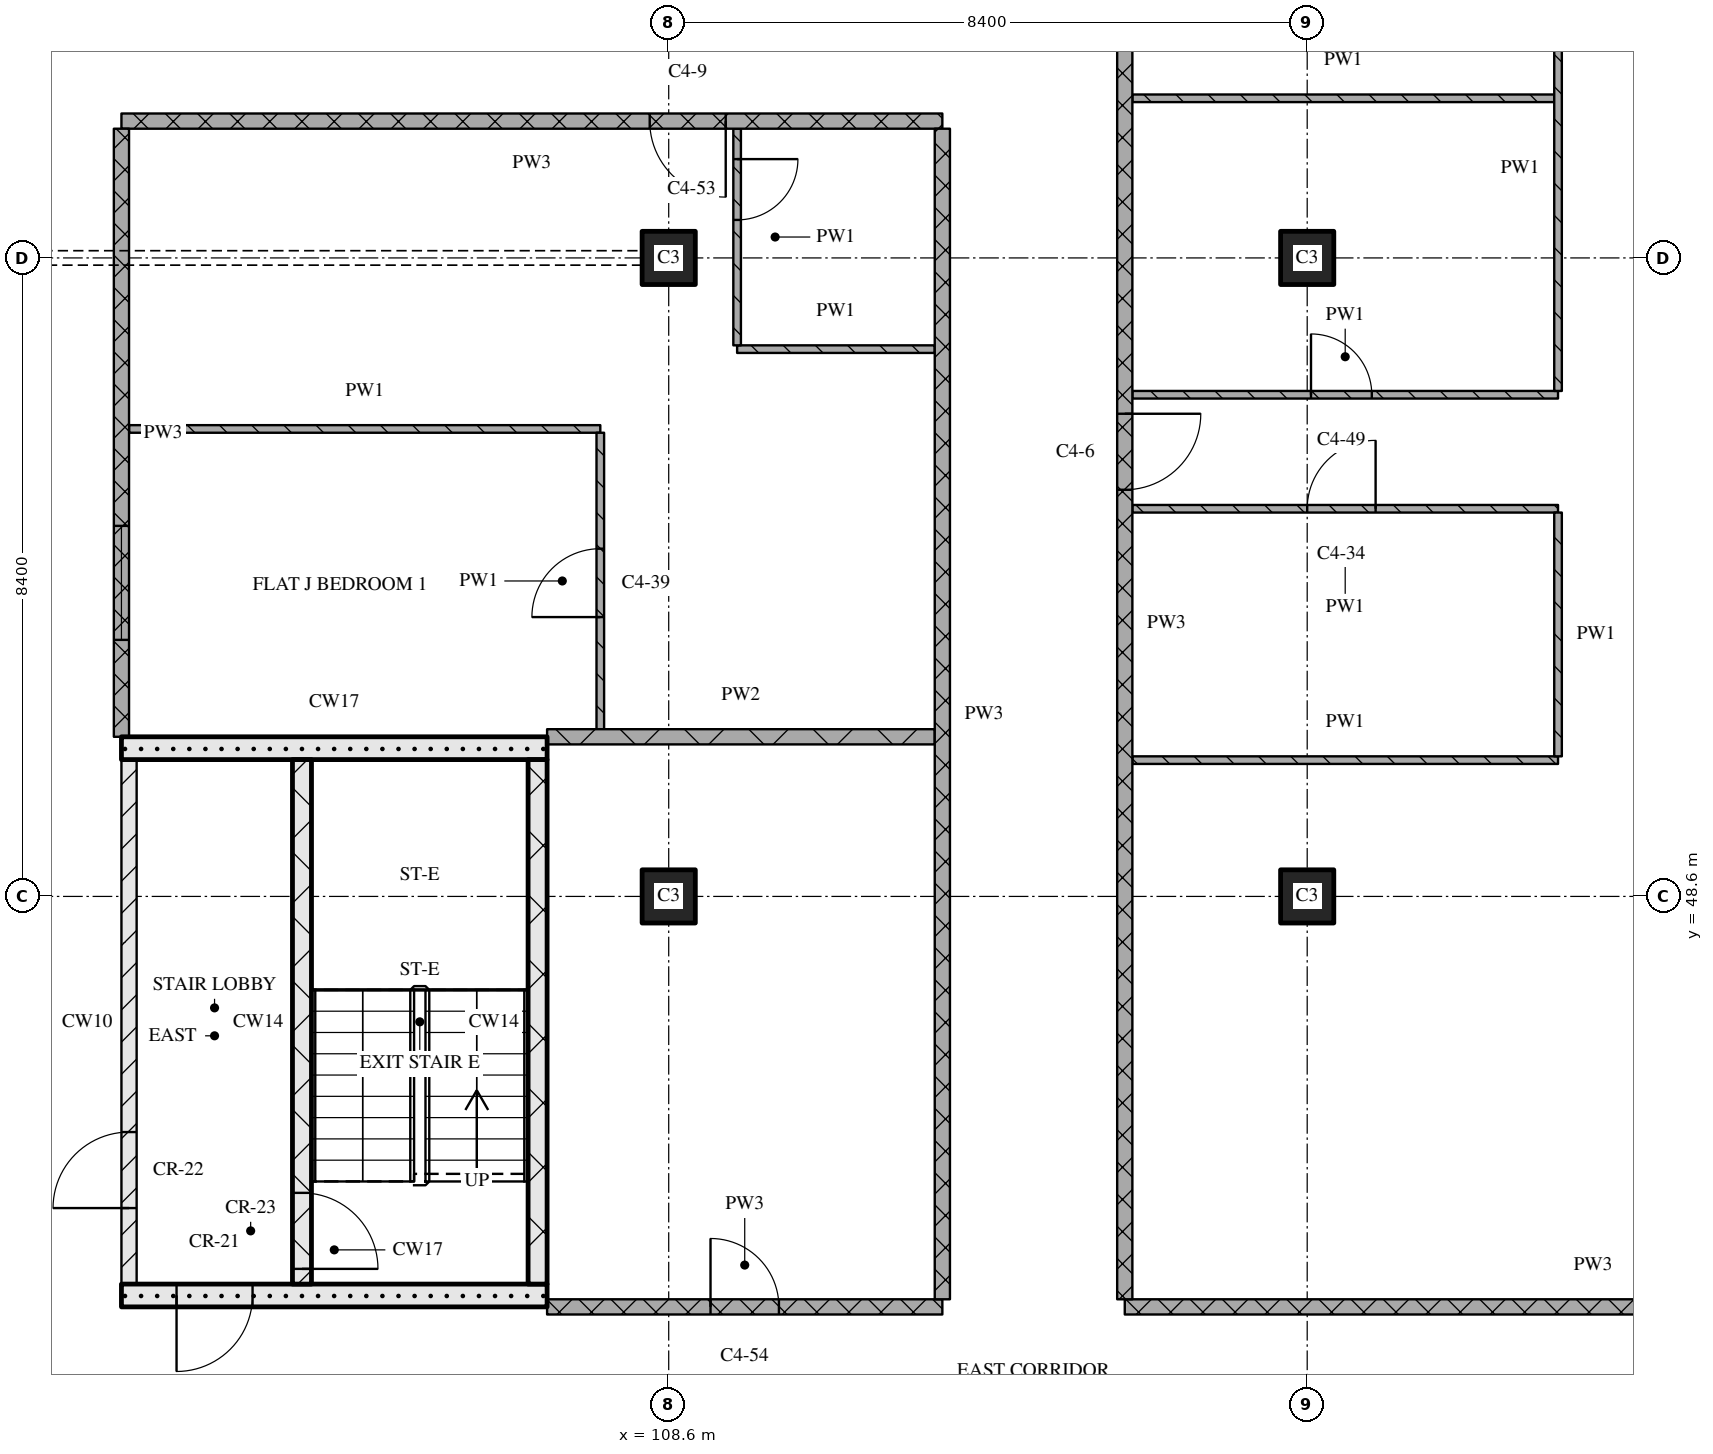
"""IFC4 building model, lengths in metres.
Left out: names, types, materials, properties, quantities, classifications, styles, units other than length and angle.
Written with IfcOpenShell. Run it as: python <this file> out.ifc"""

import sys

from ifc_helpers import new_model, si_unit, direction, frame, frame_2d, origin, origin_2d, place, context, subcontext, project, spatial, rectangle, extrude, element, fill, save


model = new_model("IFC4")
c1 = context("Model", 3, precision=1e-05, world=origin(), true_north=direction((0.0, 1.0)))
c2 = subcontext(c1, "Body", "Model", "MODEL_VIEW")
j1 = project(units=[si_unit("LENGTHUNIT", "METRE"), si_unit("PLANEANGLEUNIT", "RADIAN")], contexts=[c1])
p1 = place(None, origin())
s1 = spatial("IfcSite", under=j1, at=p1, CompositionType="ELEMENT")
p2 = place(p1, origin())
s2 = spatial("IfcBuilding", under=s1, at=p2, CompositionType="ELEMENT")
p3 = place(p2, frame((0.0, 0.0, 187.05)))
s3 = spatial("IfcBuildingStorey", under=s2, at=p3, CompositionType="ELEMENT", Elevation=187.05)
for number, where, z_axis, x_axis in (
    (1, (108.6, 48.6, 0.0), (0.0, 0.0, 1.0), (1.0, 0.0, 0.0)),
    (2, (108.6, 57.0, 0.0), (0.0, 0.0, 1.0), (1.0, 0.0, 0.0)),
    (3, (117.0, 48.6, 0.0), (0.0, 0.0, 1.0), (1.0, 0.0, 0.0)),
    (4, (117.0, 57.0, 0.0), (0.0, 0.0, 1.0), (1.0, 0.0, 0.0)),
):
    element("IfcColumn", number, at=place(p3, frame(where, z_axis=z_axis, x_axis=x_axis)), inside=s3, PredefinedType="COLUMN", context=c2, shape_type="SweptSolid", body=[
        extrude(rectangle(XDim=0.7, YDim=0.7, at=origin_2d()), origin(), (0.0, 0.0, 1.0), 3.6),
    ])
p4 = place(p3, frame((101.4, 43.35, 0.0), z_axis=(0.0, 0.0, 1.0), x_axis=(1.0, 0.0, 0.0)))
e5 = element("IfcWall", 5, at=p4, inside=s3, PredefinedType="SOLIDWALL", context=c2, shape_type="SweptSolid", body=[
    extrude(rectangle(XDim=5.6, YDim=0.3, at=frame_2d((2.8, 0.0))), origin(), (0.0, 0.0, 1.0), 3.32),
])
p5 = place(p4, frame((0.725, 0.0, 0.0)))
e6 = element("IfcOpeningElement", 6, at=p5, cuts=e5, PredefinedType="OPENING", context=c2, shape_type="SweptSolid", body=[
    extrude(rectangle(XDim=1.0, YDim=2.1, at=frame_2d((0.5, 1.05))), frame((0.0, 0.16, 0.0), z_axis=(0.0, -1.0, 0.0), x_axis=(1.0, 0.0, 0.0)), (0.0, 0.0, 1.0), 0.32),
])
p6 = place(p3, frame((101.5, 43.5, 0.0), z_axis=(0.0, 0.0, 1.0), x_axis=(0.0, 1.0, 0.0)))
e7 = element("IfcWall", 7, at=p6, inside=s3, PredefinedType="PARTITIONING", context=c2, shape_type="SweptSolid", body=[
    extrude(rectangle(XDim=6.9, YDim=0.2, at=frame_2d((3.45, 0.0))), origin(), (0.0, 0.0, 1.0), 3.32),
])
p7 = place(p6, frame((1.0, 0.0, 0.0)))
e8 = element("IfcOpeningElement", 8, at=p7, cuts=e7, PredefinedType="OPENING", context=c2, shape_type="SweptSolid", body=[
    extrude(rectangle(XDim=1.0, YDim=2.1, at=frame_2d((0.5, 1.05))), frame((0.0, 0.11, 0.0), z_axis=(0.0, -1.0, 0.0), x_axis=(1.0, 0.0, 0.0)), (0.0, 0.0, 1.0), 0.22),
])
p8 = place(p3, frame((103.775, 43.5, 0.0), z_axis=(0.0, 0.0, 1.0), x_axis=(0.0, 1.0, 0.0)))
e9 = element("IfcWall", 9, at=p8, inside=s3, PredefinedType="SOLIDWALL", context=c2, shape_type="SweptSolid", body=[
    extrude(rectangle(XDim=6.9, YDim=0.25, at=frame_2d((3.45, 0.0))), origin(), (0.0, 0.0, 1.0), 3.32),
])
p9 = place(p8, frame((0.2, 0.0, 0.0)))
e10 = element("IfcOpeningElement", 10, at=p9, cuts=e9, PredefinedType="OPENING", context=c2, shape_type="SweptSolid", body=[
    extrude(rectangle(XDim=1.0, YDim=2.1, at=frame_2d((0.5, 1.05))), frame((0.0, 0.135, 0.0), z_axis=(0.0, -1.0, 0.0), x_axis=(1.0, 0.0, 0.0)), (0.0, 0.0, 1.0), 0.27),
])
p10 = place(p3, frame((106.875, 43.5, 0.0), z_axis=(0.0, 0.0, 1.0), x_axis=(0.0, 1.0, 0.0)))
e11 = element("IfcWall", 11, at=p10, inside=s3, PredefinedType="SOLIDWALL", context=c2, shape_type="SweptSolid", body=[
    extrude(rectangle(XDim=6.9, YDim=0.25, at=frame_2d((3.45, 0.0))), origin(), (0.0, 0.0, 1.0), 3.32),
])
p11 = place(p3, frame((101.4, 50.55, 0.0), z_axis=(0.0, 0.0, 1.0), x_axis=(1.0, 0.0, 0.0)))
e12 = element("IfcWall", 12, at=p11, inside=s3, PredefinedType="SOLIDWALL", context=c2, shape_type="SweptSolid", body=[
    extrude(rectangle(XDim=5.6, YDim=0.3, at=frame_2d((2.8, 0.0))), origin(), (0.0, 0.0, 1.0), 3.32),
])
p12 = place(p3, frame((107.0, 43.2, 0.0), z_axis=(0.0, 0.0, 1.0), x_axis=(1.0, 0.0, 0.0)))
e13 = element("IfcWall", 13, at=p12, inside=s3, PredefinedType="PARTITIONING", context=c2, shape_type="SweptSolid", body=[
    extrude(rectangle(XDim=5.2, YDim=0.2, at=frame_2d((2.6, 0.0))), origin(), (0.0, 0.0, 1.0), 3.32),
])
p13 = place(p12, frame((2.15, 0.0, 0.0)))
e14 = element("IfcOpeningElement", 14, at=p13, cuts=e13, PredefinedType="OPENING", context=c2, shape_type="SweptSolid", body=[
    extrude(rectangle(XDim=0.9, YDim=2.1, at=frame_2d((0.45, 1.05))), frame((0.0, 0.11, 0.0), z_axis=(0.0, -1.0, 0.0), x_axis=(1.0, 0.0, 0.0)), (0.0, 0.0, 1.0), 0.22),
])
p14 = place(p3, frame((114.6, 43.2, 0.0), z_axis=(0.0, 0.0, 1.0), x_axis=(1.0, 0.0, 0.0)))
e15 = element("IfcWall", 15, at=p14, inside=s3, PredefinedType="PARTITIONING", context=c2, shape_type="SweptSolid", body=[
    extrude(rectangle(XDim=12.32, YDim=0.2, at=frame_2d((6.16, 0.0))), origin(), (0.0, 0.0, 1.0), 3.32),
])
p15 = place(p3, frame((114.7, 50.393, 0.0), z_axis=(0.0, 0.0, 1.0), x_axis=(1.0, 0.0, 0.0)))
e16 = element("IfcWall", 16, at=p15, inside=s3, PredefinedType="PARTITIONING", context=c2, shape_type="SweptSolid", body=[
    extrude(rectangle(XDim=5.6, YDim=0.1, at=frame_2d((2.8, 0.0))), origin(), (0.0, 0.0, 1.0), 3.32),
])
p16 = place(p3, frame((107.0, 50.7, 0.0), z_axis=(0.0, 0.0, 1.0), x_axis=(1.0, 0.0, 0.0)))
e17 = element("IfcWall", 17, at=p16, inside=s3, PredefinedType="PARTITIONING", context=c2, shape_type="SweptSolid", body=[
    extrude(rectangle(XDim=5.1, YDim=0.2, at=frame_2d((2.55, 0.0))), origin(), (0.0, 0.0, 1.0), 3.32),
])
p17 = place(p3, frame((120.3, 53.7, 0.0), z_axis=(0.0, 0.0, 1.0), x_axis=(-1.0, 0.0, 0.0)))
e18 = element("IfcWall", 18, at=p17, inside=s3, PredefinedType="PARTITIONING", context=c2, shape_type="SweptSolid", body=[
    extrude(rectangle(XDim=5.6, YDim=0.1, at=frame_2d((2.8, 0.0))), origin(), (0.0, 0.0, 1.0), 3.32),
])
p18 = place(p17, frame((2.4, 0.0, 0.0)))
e19 = element("IfcOpeningElement", 19, at=p18, cuts=e18, PredefinedType="OPENING", context=c2, shape_type="SweptSolid", body=[
    extrude(rectangle(XDim=0.9, YDim=2.1, at=frame_2d((0.45, 1.05))), frame((0.0, 0.06, 0.0), z_axis=(0.0, -1.0, 0.0), x_axis=(1.0, 0.0, 0.0)), (0.0, 0.0, 1.0), 0.12),
])
p19 = place(p3, frame((101.5, 54.75, 0.0), z_axis=(0.0, 0.0, 1.0), x_axis=(1.0, 0.0, 0.0)))
e20 = element("IfcWall", 20, at=p19, inside=s3, PredefinedType="PARTITIONING", context=c2, shape_type="SweptSolid", body=[
    extrude(rectangle(XDim=6.2, YDim=0.1, at=frame_2d((3.1, 0.0))), origin(), (0.0, 0.0, 1.0), 3.32),
])
p20 = place(p3, frame((114.7, 55.2, 0.0), z_axis=(0.0, 0.0, 1.0), x_axis=(1.0, 0.0, 0.0)))
e21 = element("IfcWall", 21, at=p20, inside=s3, PredefinedType="PARTITIONING", context=c2, shape_type="SweptSolid", body=[
    extrude(rectangle(XDim=5.6, YDim=0.1, at=frame_2d((2.8, 0.0))), origin(), (0.0, 0.0, 1.0), 3.32),
])
p21 = place(p20, frame((2.35, 0.0, 0.0)))
e22 = element("IfcOpeningElement", 22, at=p21, cuts=e21, PredefinedType="OPENING", context=c2, shape_type="SweptSolid", body=[
    extrude(rectangle(XDim=0.8, YDim=2.1, at=frame_2d((0.4, 1.05))), frame((0.0, 0.06, 0.0), z_axis=(0.0, -1.0, 0.0), x_axis=(1.0, 0.0, 0.0)), (0.0, 0.0, 1.0), 0.12),
])
p22 = place(p3, frame((109.5, 55.8, 0.0), z_axis=(0.0, 0.0, 1.0), x_axis=(1.0, 0.0, 0.0)))
e23 = element("IfcWall", 23, at=p22, inside=s3, PredefinedType="PARTITIONING", context=c2, shape_type="SweptSolid", body=[
    extrude(rectangle(XDim=2.6, YDim=0.1, at=frame_2d((1.3, 0.0))), origin(), (0.0, 0.0, 1.0), 3.32),
])
p23 = place(p3, frame((112.2, 58.8, 0.0), z_axis=(0.0, 0.0, 1.0), x_axis=(-1.0, 0.0, 0.0)))
e24 = element("IfcWall", 24, at=p23, inside=s3, PredefinedType="PARTITIONING", context=c2, shape_type="SweptSolid", body=[
    extrude(rectangle(XDim=10.8, YDim=0.2, at=frame_2d((5.4, 0.0))), origin(), (0.0, 0.0, 1.0), 3.32),
])
p24 = place(p23, frame((2.85, 0.0, 0.0)))
e25 = element("IfcOpeningElement", 25, at=p24, cuts=e24, PredefinedType="OPENING", context=c2, shape_type="SweptSolid", body=[
    extrude(rectangle(XDim=1.0, YDim=2.1, at=frame_2d((0.5, 1.05))), frame((0.0, 0.11, 0.0), z_axis=(0.0, -1.0, 0.0), x_axis=(1.0, 0.0, 0.0)), (0.0, 0.0, 1.0), 0.22),
])
p25 = place(p3, frame((114.7, 59.1, 0.0), z_axis=(0.0, 0.0, 1.0), x_axis=(1.0, 0.0, 0.0)))
e26 = element("IfcWall", 26, at=p25, inside=s3, PredefinedType="PARTITIONING", context=c2, shape_type="SweptSolid", body=[
    extrude(rectangle(XDim=5.55, YDim=0.1, at=frame_2d((2.775, 0.0))), origin(), (0.0, 0.0, 1.0), 3.32),
])
p26 = place(p3, frame((101.4, 58.7, 0.0), z_axis=(0.0, 0.0, 1.0), x_axis=(0.0, -1.0, 0.0)))
e27 = element("IfcWall", 27, at=p26, inside=s3, PredefinedType="PARTITIONING", context=c2, shape_type="SweptSolid", body=[
    extrude(rectangle(XDim=8.0, YDim=0.2, at=frame_2d((4.0, 0.0))), origin(), (0.0, 0.0, 1.0), 3.32),
])
p27 = place(p26, frame((5.225, 0.0, 0.9)))
e28 = element("IfcOpeningElement", 28, at=p27, cuts=e27, PredefinedType="OPENING", context=c2, shape_type="SweptSolid", body=[
    extrude(rectangle(XDim=1.5, YDim=1.5, at=frame_2d((0.75, 0.75))), frame((0.0, 0.11, 0.0), z_axis=(0.0, -1.0, 0.0), x_axis=(1.0, 0.0, 0.0)), (0.0, 0.0, 1.0), 0.22),
])
p28 = place(p3, frame((107.7, 50.8, 0.0), z_axis=(0.0, 0.0, 1.0), x_axis=(0.0, 1.0, 0.0)))
e29 = element("IfcWall", 29, at=p28, inside=s3, PredefinedType="PARTITIONING", context=c2, shape_type="SweptSolid", body=[
    extrude(rectangle(XDim=3.9, YDim=0.1, at=frame_2d((1.95, 0.0))), origin(), (0.0, 0.0, 1.0), 3.32),
])
p29 = place(p28, frame((1.475, 0.0, 0.0)))
e30 = element("IfcOpeningElement", 30, at=p29, cuts=e29, PredefinedType="OPENING", context=c2, shape_type="SweptSolid", body=[
    extrude(rectangle(XDim=0.9, YDim=2.1, at=frame_2d((0.45, 1.05))), frame((0.0, 0.06, 0.0), z_axis=(0.0, -1.0, 0.0), x_axis=(1.0, 0.0, 0.0)), (0.0, 0.0, 1.0), 0.12),
])
p30 = place(p3, frame((109.5, 58.7, 0.0), z_axis=(0.0, 0.0, 1.0), x_axis=(0.0, -1.0, 0.0)))
e31 = element("IfcWall", 31, at=p30, inside=s3, PredefinedType="PARTITIONING", context=c2, shape_type="SweptSolid", body=[
    extrude(rectangle(XDim=2.85, YDim=0.1, at=frame_2d((1.425, 0.0))), origin(), (0.0, 0.0, 1.0), 3.32),
])
p31 = place(p30, frame((0.4, 0.0, 0.0)))
e32 = element("IfcOpeningElement", 32, at=p31, cuts=e31, PredefinedType="OPENING", context=c2, shape_type="SweptSolid", body=[
    extrude(rectangle(XDim=0.8, YDim=2.1, at=frame_2d((0.4, 1.05))), frame((0.0, 0.06, 0.0), z_axis=(0.0, -1.0, 0.0), x_axis=(1.0, 0.0, 0.0)), (0.0, 0.0, 1.0), 0.12),
])
p32 = place(p3, frame((112.2, 58.7, 0.0), z_axis=(0.0, 0.0, 1.0), x_axis=(0.0, -1.0, 0.0)))
e33 = element("IfcWall", 33, at=p32, inside=s3, PredefinedType="PARTITIONING", context=c2, shape_type="SweptSolid", body=[
    extrude(rectangle(XDim=15.4, YDim=0.2, at=frame_2d((7.7, 0.0))), origin(), (0.0, 0.0, 1.0), 3.32),
])
p33 = place(p3, frame((114.6, 61.1, 0.0), z_axis=(0.0, 0.0, 1.0), x_axis=(0.0, -1.0, 0.0)))
e34 = element("IfcWall", 34, at=p33, inside=s3, PredefinedType="PARTITIONING", context=c2, shape_type="SweptSolid", body=[
    extrude(rectangle(XDim=17.8, YDim=0.2, at=frame_2d((8.9, 0.0))), origin(), (0.0, 0.0, 1.0), 3.32),
])
p34 = place(p33, frame((6.15, 0.0, 0.0)))
e35 = element("IfcOpeningElement", 35, at=p34, cuts=e34, PredefinedType="OPENING", context=c2, shape_type="SweptSolid", body=[
    extrude(rectangle(XDim=1.0, YDim=2.1, at=frame_2d((0.5, 1.05))), frame((0.0, 0.11, 0.0), z_axis=(0.0, -1.0, 0.0), x_axis=(1.0, 0.0, 0.0)), (0.0, 0.0, 1.0), 0.22),
])
p35 = place(p3, frame((120.3, 53.65, 0.0), z_axis=(0.0, 0.0, 1.0), x_axis=(0.0, -1.0, 0.0)))
e36 = element("IfcWall", 36, at=p35, inside=s3, PredefinedType="PARTITIONING", context=c2, shape_type="SweptSolid", body=[
    extrude(rectangle(XDim=3.207, YDim=0.1, at=frame_2d((1.604, 0.0))), origin(), (0.0, 0.0, 1.0), 3.32),
])
p36 = place(p3, frame((120.3, 55.25, 0.0), z_axis=(0.0, 0.0, 1.0), x_axis=(0.0, 1.0, 0.0)))
e37 = element("IfcWall", 37, at=p36, inside=s3, PredefinedType="PARTITIONING", context=c2, shape_type="SweptSolid", body=[
    extrude(rectangle(XDim=5.85, YDim=0.1, at=frame_2d((2.925, 0.0))), origin(), (0.0, 0.0, 1.0), 3.32),
])
p37 = place(p36, frame((4.5, 0.0, 0.0)))
e38 = element("IfcOpeningElement", 38, at=p37, cuts=e37, PredefinedType="OPENING", context=c2, shape_type="SweptSolid", body=[
    extrude(rectangle(XDim=0.8, YDim=2.1, at=frame_2d((0.4, 1.05))), frame((0.0, 0.06, 0.0), z_axis=(0.0, -1.0, 0.0), x_axis=(1.0, 0.0, 0.0)), (0.0, 0.0, 1.0), 0.12),
])
p38 = place(p5, origin())
e39 = element("IfcDoor", 39, at=p38, inside=s3, OperationType="SINGLE_SWING_RIGHT", PredefinedType="DOOR", context=c2, shape_type="SweptSolid", body=[
    extrude(rectangle(XDim=1.0, YDim=2.1, at=frame_2d((0.5, 1.05))), frame((0.0, 0.025, 0.0), z_axis=(0.0, -1.0, 0.0), x_axis=(1.0, 0.0, 0.0)), (0.0, 0.0, 1.0), 0.05),
])
fill(e6, e39)
p39 = place(p9, origin())
e40 = element("IfcDoor", 40, at=p39, inside=s3, OperationType="SINGLE_SWING_RIGHT", PredefinedType="DOOR", context=c2, shape_type="SweptSolid", body=[
    extrude(rectangle(XDim=1.0, YDim=2.1, at=frame_2d((0.5, 1.05))), frame((0.0, 0.025, 0.0), z_axis=(0.0, -1.0, 0.0), x_axis=(1.0, 0.0, 0.0)), (0.0, 0.0, 1.0), 0.05),
])
fill(e10, e40)
p40 = place(p7, origin())
e41 = element("IfcDoor", 41, at=p40, inside=s3, OperationType="SINGLE_SWING_LEFT", PredefinedType="DOOR", context=c2, shape_type="SweptSolid", body=[
    extrude(rectangle(XDim=1.0, YDim=2.1, at=frame_2d((0.5, 1.05))), frame((0.0, 0.025, 0.0), z_axis=(0.0, -1.0, 0.0), x_axis=(1.0, 0.0, 0.0)), (0.0, 0.0, 1.0), 0.05),
])
fill(e8, e41)
p41 = place(p13, origin())
e42 = element("IfcDoor", 42, at=p41, inside=s3, OperationType="SINGLE_SWING_LEFT", PredefinedType="DOOR", context=c2, shape_type="SweptSolid", body=[
    extrude(rectangle(XDim=0.9, YDim=2.1, at=frame_2d((0.45, 1.05))), frame((0.0, 0.025, 0.0), z_axis=(0.0, -1.0, 0.0), x_axis=(1.0, 0.0, 0.0)), (0.0, 0.0, 1.0), 0.05),
])
fill(e14, e42)
p42 = place(p18, origin())
e43 = element("IfcDoor", 43, at=p42, inside=s3, OperationType="SINGLE_SWING_RIGHT", PredefinedType="DOOR", context=c2, shape_type="SweptSolid", body=[
    extrude(rectangle(XDim=0.9, YDim=2.1, at=frame_2d((0.45, 1.05))), frame((0.0, 0.025, 0.0), z_axis=(0.0, -1.0, 0.0), x_axis=(1.0, 0.0, 0.0)), (0.0, 0.0, 1.0), 0.05),
])
fill(e19, e43)
p43 = place(p21, origin())
e44 = element("IfcDoor", 44, at=p43, inside=s3, OperationType="SINGLE_SWING_LEFT", PredefinedType="DOOR", context=c2, shape_type="SweptSolid", body=[
    extrude(rectangle(XDim=0.8, YDim=2.1, at=frame_2d((0.4, 1.05))), frame((0.0, 0.025, 0.0), z_axis=(0.0, -1.0, 0.0), x_axis=(1.0, 0.0, 0.0)), (0.0, 0.0, 1.0), 0.05),
])
fill(e22, e44)
p44 = place(p24, origin())
e45 = element("IfcDoor", 45, at=p44, inside=s3, OperationType="SINGLE_SWING_LEFT", PredefinedType="DOOR", context=c2, shape_type="SweptSolid", body=[
    extrude(rectangle(XDim=1.0, YDim=2.1, at=frame_2d((0.5, 1.05))), frame((0.0, 0.025, 0.0), z_axis=(0.0, -1.0, 0.0), x_axis=(1.0, 0.0, 0.0)), (0.0, 0.0, 1.0), 0.05),
])
fill(e25, e45)
p45 = place(p29, origin())
e46 = element("IfcDoor", 46, at=p45, inside=s3, OperationType="SINGLE_SWING_LEFT", PredefinedType="DOOR", context=c2, shape_type="SweptSolid", body=[
    extrude(rectangle(XDim=0.9, YDim=2.1, at=frame_2d((0.45, 1.05))), frame((0.0, 0.025, 0.0), z_axis=(0.0, -1.0, 0.0), x_axis=(1.0, 0.0, 0.0)), (0.0, 0.0, 1.0), 0.05),
])
fill(e30, e46)
p46 = place(p31, origin())
e47 = element("IfcDoor", 47, at=p46, inside=s3, OperationType="SINGLE_SWING_LEFT", PredefinedType="DOOR", context=c2, shape_type="SweptSolid", body=[
    extrude(rectangle(XDim=0.8, YDim=2.1, at=frame_2d((0.4, 1.05))), frame((0.0, 0.025, 0.0), z_axis=(0.0, -1.0, 0.0), x_axis=(1.0, 0.0, 0.0)), (0.0, 0.0, 1.0), 0.05),
])
fill(e32, e47)
p47 = place(p34, origin())
e48 = element("IfcDoor", 48, at=p47, inside=s3, OperationType="SINGLE_SWING_LEFT", PredefinedType="DOOR", context=c2, shape_type="SweptSolid", body=[
    extrude(rectangle(XDim=1.0, YDim=2.1, at=frame_2d((0.5, 1.05))), frame((0.0, 0.025, 0.0), z_axis=(0.0, -1.0, 0.0), x_axis=(1.0, 0.0, 0.0)), (0.0, 0.0, 1.0), 0.05),
])
fill(e35, e48)
p48 = place(p27, origin())
e49 = element("IfcWindow", 49, at=p48, inside=s3, PartitioningType="SINGLE_PANEL", PredefinedType="WINDOW", context=c2, shape_type="SweptSolid", body=[
    extrude(rectangle(XDim=1.5, YDim=1.5, at=frame_2d((0.75, 0.75))), frame((0.0, 0.03, 0.0), z_axis=(0.0, -1.0, 0.0), x_axis=(1.0, 0.0, 0.0)), (0.0, 0.0, 1.0), 0.06),
])
fill(e28, e49)
save(model, sys.argv[1])
